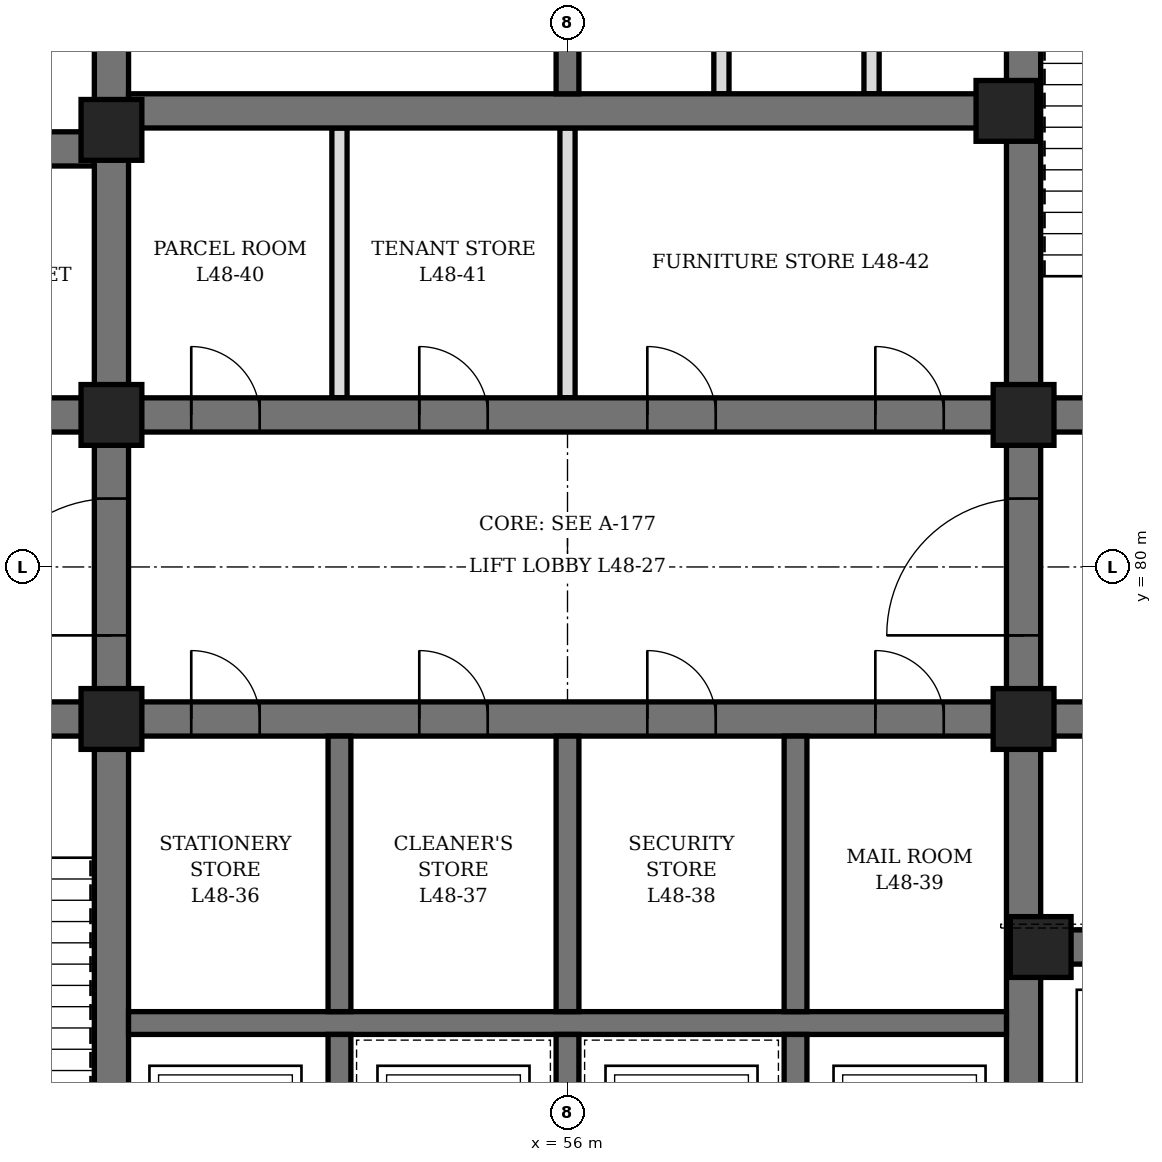
"""IFC4 building model, lengths in metres.
Left out: names, types, materials, properties, quantities, classifications, styles, units other than length and angle.
Written with IfcOpenShell. Run it as: python <this file> out.ifc"""

import sys

from ifc_helpers import new_model, si_unit, direction, frame, frame_2d, origin, origin_2d, place, context, subcontext, project, spatial, rectangle, hollow_rectangle, extrude, element, fill, save


model = new_model("IFC4")
c1 = context("Model", 3, precision=1e-05, world=origin(), true_north=direction((0.0, 1.0)))
c2 = subcontext(c1, "Body", "Model", "MODEL_VIEW")
j1 = project(units=[si_unit("LENGTHUNIT", "METRE"), si_unit("PLANEANGLEUNIT", "RADIAN")], contexts=[c1])
p1 = place(None, origin())
s1 = spatial("IfcSite", under=j1, at=p1, CompositionType="ELEMENT")
p2 = place(p1, origin())
s2 = spatial("IfcBuilding", under=s1, at=p2, CompositionType="ELEMENT")
p3 = place(p2, frame((0.0, 0.0, 214.9)))
s3 = spatial("IfcBuildingStorey", under=s2, at=p3, CompositionType="ELEMENT", Elevation=214.9)
p4 = place(p3, frame((50.0, 71.6, 0.0), z_axis=(0.0, 0.0, 1.0), x_axis=(0.0, 1.0, 0.0)))
e1 = element("IfcWall", 1, at=p4, inside=s3, PredefinedType="SHEAR", context=c2, shape_type="SweptSolid", body=[
    extrude(rectangle(XDim=16.8, YDim=0.45, at=frame_2d((8.4, 0.0))), origin(), (0.0, 0.0, 1.0), 4.2),
])
p5 = place(p4, frame((7.5, 0.0, 0.0)))
e2 = element("IfcOpeningElement", 2, at=p5, cuts=e1, PredefinedType="OPENING", context=c2, shape_type="SweptSolid", body=[
    extrude(rectangle(XDim=1.8, YDim=2.4, at=frame_2d((0.9, 1.2))), frame((0.0, 0.235, 0.0), z_axis=(0.0, -1.0, 0.0), x_axis=(1.0, 0.0, 0.0)), (0.0, 0.0, 1.0), 0.47),
])
p6 = place(p3, frame((62.0, 71.6, 0.0), z_axis=(0.0, 0.0, 1.0), x_axis=(0.0, 1.0, 0.0)))
e3 = element("IfcWall", 3, at=p6, inside=s3, PredefinedType="SHEAR", context=c2, shape_type="SweptSolid", body=[
    extrude(rectangle(XDim=16.8, YDim=0.45, at=frame_2d((8.4, 0.0))), origin(), (0.0, 0.0, 1.0), 4.2),
])
p7 = place(p6, frame((7.5, 0.0, 0.0)))
e4 = element("IfcOpeningElement", 4, at=p7, cuts=e3, PredefinedType="OPENING", context=c2, shape_type="SweptSolid", body=[
    extrude(rectangle(XDim=1.8, YDim=2.4, at=frame_2d((0.9, 1.2))), frame((0.0, 0.235, 0.0), z_axis=(0.0, -1.0, 0.0), x_axis=(1.0, 0.0, 0.0)), (0.0, 0.0, 1.0), 0.47),
])
p8 = place(p3, frame((44.6, 78.0, 0.0), z_axis=(0.0, 0.0, 1.0), x_axis=(1.0, 0.0, 0.0)))
e5 = element("IfcWall", 5, at=p8, inside=s3, PredefinedType="SHEAR", context=c2, shape_type="SweptSolid", body=[
    extrude(rectangle(XDim=5.175, YDim=0.45, at=frame_2d((2.587, 0.0))), origin(), (0.0, 0.0, 1.0), 4.2),
])
p9 = place(p8, frame((1.8, 0.0, 0.0)))
e6 = element("IfcOpeningElement", 6, at=p9, cuts=e5, PredefinedType="OPENING", context=c2, shape_type="SweptSolid", body=[
    extrude(rectangle(XDim=1.2, YDim=2.1, at=frame_2d((0.6, 1.05))), frame((0.0, 0.235, 0.0), z_axis=(0.0, -1.0, 0.0), x_axis=(1.0, 0.0, 0.0)), (0.0, 0.0, 1.0), 0.47),
])
p10 = place(p3, frame((44.6, 82.0, 0.0), z_axis=(0.0, 0.0, 1.0), x_axis=(1.0, 0.0, 0.0)))
e7 = element("IfcWall", 7, at=p10, inside=s3, PredefinedType="SHEAR", context=c2, shape_type="SweptSolid", body=[
    extrude(rectangle(XDim=5.175, YDim=0.45, at=frame_2d((2.587, 0.0))), origin(), (0.0, 0.0, 1.0), 4.2),
])
p11 = place(p10, frame((0.7, 0.0, 0.0)))
e8 = element("IfcOpeningElement", 8, at=p11, cuts=e7, PredefinedType="OPENING", context=c2, shape_type="SweptSolid", body=[
    extrude(rectangle(XDim=0.9, YDim=2.1, at=frame_2d((0.45, 1.05))), frame((0.0, 0.235, 0.0), z_axis=(0.0, -1.0, 0.0), x_axis=(1.0, 0.0, 0.0)), (0.0, 0.0, 1.0), 0.47),
])
p12 = place(p3, frame((44.6, 85.5, 0.0), z_axis=(0.0, 0.0, 1.0), x_axis=(1.0, 0.0, 0.0)))
e9 = element("IfcWall", 9, at=p12, inside=s3, PredefinedType="SHEAR", context=c2, shape_type="SweptSolid", body=[
    extrude(rectangle(XDim=5.175, YDim=0.45, at=frame_2d((2.587, 0.0))), origin(), (0.0, 0.0, 1.0), 4.2),
])
p13 = place(p12, frame((0.7, 0.0, 0.0)))
e10 = element("IfcOpeningElement", 10, at=p13, cuts=e9, PredefinedType="OPENING", context=c2, shape_type="SweptSolid", body=[
    extrude(rectangle(XDim=0.9, YDim=2.1, at=frame_2d((0.45, 1.05))), frame((0.0, 0.235, 0.0), z_axis=(0.0, -1.0, 0.0), x_axis=(1.0, 0.0, 0.0)), (0.0, 0.0, 1.0), 0.47),
])
p14 = place(p3, frame((62.225, 75.0, 0.0), z_axis=(0.0, 0.0, 1.0), x_axis=(1.0, 0.0, 0.0)))
e11 = element("IfcWall", 11, at=p14, inside=s3, PredefinedType="SHEAR", context=c2, shape_type="SweptSolid", body=[
    extrude(rectangle(XDim=5.175, YDim=0.45, at=frame_2d((2.587, 0.0))), origin(), (0.0, 0.0, 1.0), 4.2),
])
p15 = place(p14, frame((0.675, 0.0, 0.0)))
e12 = element("IfcOpeningElement", 12, at=p15, cuts=e11, PredefinedType="OPENING", context=c2, shape_type="SweptSolid", body=[
    extrude(rectangle(XDim=1.2, YDim=2.2, at=frame_2d((0.6, 1.1))), frame((0.0, 0.235, 0.0), z_axis=(0.0, -1.0, 0.0), x_axis=(1.0, 0.0, 0.0)), (0.0, 0.0, 1.0), 0.47),
])
p16 = place(p14, frame((3.425, 0.0, 0.0)))
e13 = element("IfcOpeningElement", 13, at=p16, cuts=e11, PredefinedType="OPENING", context=c2, shape_type="SweptSolid", body=[
    extrude(rectangle(XDim=1.2, YDim=2.2, at=frame_2d((0.6, 1.1))), frame((0.0, 0.235, 0.0), z_axis=(0.0, -1.0, 0.0), x_axis=(1.0, 0.0, 0.0)), (0.0, 0.0, 1.0), 0.47),
])
p17 = place(p3, frame((62.225, 78.0, 0.0), z_axis=(0.0, 0.0, 1.0), x_axis=(1.0, 0.0, 0.0)))
e14 = element("IfcWall", 14, at=p17, inside=s3, PredefinedType="SHEAR", context=c2, shape_type="SweptSolid", body=[
    extrude(rectangle(XDim=5.175, YDim=0.45, at=frame_2d((2.587, 0.0))), origin(), (0.0, 0.0, 1.0), 4.2),
])
p18 = place(p17, frame((2.175, 0.0, 0.0)))
e15 = element("IfcOpeningElement", 15, at=p18, cuts=e14, PredefinedType="OPENING", context=c2, shape_type="SweptSolid", body=[
    extrude(rectangle(XDim=1.2, YDim=2.1, at=frame_2d((0.6, 1.05))), frame((0.0, 0.235, 0.0), z_axis=(0.0, -1.0, 0.0), x_axis=(1.0, 0.0, 0.0)), (0.0, 0.0, 1.0), 0.47),
])
p19 = place(p3, frame((62.225, 82.0, 0.0), z_axis=(0.0, 0.0, 1.0), x_axis=(1.0, 0.0, 0.0)))
e16 = element("IfcWall", 16, at=p19, inside=s3, PredefinedType="SHEAR", context=c2, shape_type="SweptSolid", body=[
    extrude(rectangle(XDim=5.175, YDim=0.45, at=frame_2d((2.587, 0.0))), origin(), (0.0, 0.0, 1.0), 4.2),
])
p20 = place(p19, frame((2.175, 0.0, 0.0)))
e17 = element("IfcOpeningElement", 17, at=p20, cuts=e16, PredefinedType="OPENING", context=c2, shape_type="SweptSolid", body=[
    extrude(rectangle(XDim=1.2, YDim=2.1, at=frame_2d((0.6, 1.05))), frame((0.0, 0.235, 0.0), z_axis=(0.0, -1.0, 0.0), x_axis=(1.0, 0.0, 0.0)), (0.0, 0.0, 1.0), 0.47),
])
p21 = place(p3, frame((50.225, 78.0, 0.0), z_axis=(0.0, 0.0, 1.0), x_axis=(1.0, 0.0, 0.0)))
e18 = element("IfcWall", 18, at=p21, inside=s3, PredefinedType="SHEAR", context=c2, shape_type="SweptSolid", body=[
    extrude(rectangle(XDim=11.55, YDim=0.45, at=frame_2d((5.775, 0.0))), origin(), (0.0, 0.0, 1.0), 4.2),
])
p22 = place(p21, frame((0.825, 0.0, 0.0)))
e19 = element("IfcOpeningElement", 19, at=p22, cuts=e18, PredefinedType="OPENING", context=c2, shape_type="SweptSolid", body=[
    extrude(rectangle(XDim=0.9, YDim=2.1, at=frame_2d((0.45, 1.05))), frame((0.0, 0.235, 0.0), z_axis=(0.0, -1.0, 0.0), x_axis=(1.0, 0.0, 0.0)), (0.0, 0.0, 1.0), 0.47),
])
p23 = place(p21, frame((3.825, 0.0, 0.0)))
e20 = element("IfcOpeningElement", 20, at=p23, cuts=e18, PredefinedType="OPENING", context=c2, shape_type="SweptSolid", body=[
    extrude(rectangle(XDim=0.9, YDim=2.1, at=frame_2d((0.45, 1.05))), frame((0.0, 0.235, 0.0), z_axis=(0.0, -1.0, 0.0), x_axis=(1.0, 0.0, 0.0)), (0.0, 0.0, 1.0), 0.47),
])
p24 = place(p21, frame((6.825, 0.0, 0.0)))
e21 = element("IfcOpeningElement", 21, at=p24, cuts=e18, PredefinedType="OPENING", context=c2, shape_type="SweptSolid", body=[
    extrude(rectangle(XDim=0.9, YDim=2.1, at=frame_2d((0.45, 1.05))), frame((0.0, 0.235, 0.0), z_axis=(0.0, -1.0, 0.0), x_axis=(1.0, 0.0, 0.0)), (0.0, 0.0, 1.0), 0.47),
])
p25 = place(p21, frame((9.825, 0.0, 0.0)))
e22 = element("IfcOpeningElement", 22, at=p25, cuts=e18, PredefinedType="OPENING", context=c2, shape_type="SweptSolid", body=[
    extrude(rectangle(XDim=0.9, YDim=2.1, at=frame_2d((0.45, 1.05))), frame((0.0, 0.235, 0.0), z_axis=(0.0, -1.0, 0.0), x_axis=(1.0, 0.0, 0.0)), (0.0, 0.0, 1.0), 0.47),
])
p26 = place(p3, frame((50.225, 82.0, 0.0), z_axis=(0.0, 0.0, 1.0), x_axis=(1.0, 0.0, 0.0)))
e23 = element("IfcWall", 23, at=p26, inside=s3, PredefinedType="SHEAR", context=c2, shape_type="SweptSolid", body=[
    extrude(rectangle(XDim=11.55, YDim=0.45, at=frame_2d((5.775, 0.0))), origin(), (0.0, 0.0, 1.0), 4.2),
])
p27 = place(p26, frame((0.825, 0.0, 0.0)))
e24 = element("IfcOpeningElement", 24, at=p27, cuts=e23, PredefinedType="OPENING", context=c2, shape_type="SweptSolid", body=[
    extrude(rectangle(XDim=0.9, YDim=2.1, at=frame_2d((0.45, 1.05))), frame((0.0, 0.235, 0.0), z_axis=(0.0, -1.0, 0.0), x_axis=(1.0, 0.0, 0.0)), (0.0, 0.0, 1.0), 0.47),
])
p28 = place(p26, frame((3.825, 0.0, 0.0)))
e25 = element("IfcOpeningElement", 25, at=p28, cuts=e23, PredefinedType="OPENING", context=c2, shape_type="SweptSolid", body=[
    extrude(rectangle(XDim=0.9, YDim=2.1, at=frame_2d((0.45, 1.05))), frame((0.0, 0.235, 0.0), z_axis=(0.0, -1.0, 0.0), x_axis=(1.0, 0.0, 0.0)), (0.0, 0.0, 1.0), 0.47),
])
p29 = place(p26, frame((6.825, 0.0, 0.0)))
e26 = element("IfcOpeningElement", 26, at=p29, cuts=e23, PredefinedType="OPENING", context=c2, shape_type="SweptSolid", body=[
    extrude(rectangle(XDim=0.9, YDim=2.1, at=frame_2d((0.45, 1.05))), frame((0.0, 0.235, 0.0), z_axis=(0.0, -1.0, 0.0), x_axis=(1.0, 0.0, 0.0)), (0.0, 0.0, 1.0), 0.47),
])
p30 = place(p26, frame((9.825, 0.0, 0.0)))
e27 = element("IfcOpeningElement", 27, at=p30, cuts=e23, PredefinedType="OPENING", context=c2, shape_type="SweptSolid", body=[
    extrude(rectangle(XDim=0.9, YDim=2.1, at=frame_2d((0.45, 1.05))), frame((0.0, 0.235, 0.0), z_axis=(0.0, -1.0, 0.0), x_axis=(1.0, 0.0, 0.0)), (0.0, 0.0, 1.0), 0.47),
])
p31 = place(p3, frame((50.225, 86.0, 0.0), z_axis=(0.0, 0.0, 1.0), x_axis=(1.0, 0.0, 0.0)))
e28 = element("IfcWall", 28, at=p31, inside=s3, PredefinedType="SHEAR", context=c2, shape_type="SweptSolid", body=[
    extrude(rectangle(XDim=11.55, YDim=0.45, at=frame_2d((5.775, 0.0))), origin(), (0.0, 0.0, 1.0), 4.2),
])
p32 = place(p3, frame((50.225, 74.0, 0.0), z_axis=(0.0, 0.0, 1.0), x_axis=(1.0, 0.0, 0.0)))
e29 = element("IfcWall", 29, at=p32, inside=s3, PredefinedType="SHEAR", context=c2, shape_type="SweptSolid", body=[
    extrude(rectangle(XDim=11.55, YDim=0.3, at=frame_2d((5.775, 0.0))), origin(), (0.0, 0.0, 1.0), 4.2),
])
p33 = place(p3, frame((53.0, 71.6, 0.0), z_axis=(0.0, 0.0, 1.0), x_axis=(0.0, 1.0, 0.0)))
e30 = element("IfcWall", 30, at=p33, inside=s3, PredefinedType="SHEAR", context=c2, shape_type="SweptSolid", body=[
    extrude(rectangle(XDim=2.25, YDim=0.3, at=frame_2d((1.125, 0.0))), origin(), (0.0, 0.0, 1.0), 4.2),
])
p34 = place(p3, frame((53.0, 74.15, 0.0), z_axis=(0.0, 0.0, 1.0), x_axis=(0.0, 1.0, 0.0)))
e31 = element("IfcWall", 31, at=p34, inside=s3, PredefinedType="SHEAR", context=c2, shape_type="SweptSolid", body=[
    extrude(rectangle(XDim=3.625, YDim=0.3, at=frame_2d((1.812, 0.0))), origin(), (0.0, 0.0, 1.0), 4.2),
])
p35 = place(p3, frame((56.0, 71.6, 0.0), z_axis=(0.0, 0.0, 1.0), x_axis=(0.0, 1.0, 0.0)))
e32 = element("IfcWall", 32, at=p35, inside=s3, PredefinedType="SHEAR", context=c2, shape_type="SweptSolid", body=[
    extrude(rectangle(XDim=2.25, YDim=0.3, at=frame_2d((1.125, 0.0))), origin(), (0.0, 0.0, 1.0), 4.2),
])
p36 = place(p3, frame((56.0, 74.15, 0.0), z_axis=(0.0, 0.0, 1.0), x_axis=(0.0, 1.0, 0.0)))
e33 = element("IfcWall", 33, at=p36, inside=s3, PredefinedType="SHEAR", context=c2, shape_type="SweptSolid", body=[
    extrude(rectangle(XDim=3.625, YDim=0.3, at=frame_2d((1.812, 0.0))), origin(), (0.0, 0.0, 1.0), 4.2),
])
p37 = place(p3, frame((59.0, 71.6, 0.0), z_axis=(0.0, 0.0, 1.0), x_axis=(0.0, 1.0, 0.0)))
e34 = element("IfcWall", 34, at=p37, inside=s3, PredefinedType="SHEAR", context=c2, shape_type="SweptSolid", body=[
    extrude(rectangle(XDim=2.25, YDim=0.3, at=frame_2d((1.125, 0.0))), origin(), (0.0, 0.0, 1.0), 4.2),
])
p38 = place(p3, frame((59.0, 74.15, 0.0), z_axis=(0.0, 0.0, 1.0), x_axis=(0.0, 1.0, 0.0)))
e35 = element("IfcWall", 35, at=p38, inside=s3, PredefinedType="SHEAR", context=c2, shape_type="SweptSolid", body=[
    extrude(rectangle(XDim=3.625, YDim=0.3, at=frame_2d((1.812, 0.0))), origin(), (0.0, 0.0, 1.0), 4.2),
])
p39 = place(p3, frame((56.0, 86.225, 0.0), z_axis=(0.0, 0.0, 1.0), x_axis=(0.0, 1.0, 0.0)))
e36 = element("IfcWall", 36, at=p39, inside=s3, PredefinedType="SHEAR", context=c2, shape_type="SweptSolid", body=[
    extrude(rectangle(XDim=2.175, YDim=0.3, at=frame_2d((1.087, 0.0))), origin(), (0.0, 0.0, 1.0), 4.2),
])
for number, where, z_axis, x_axis in (
    (37, (50.0, 78.0, 0.0), (0.0, 0.0, 1.0), (1.0, 0.0, 0.0)),
    (38, (50.0, 82.0, 0.0), (0.0, 0.0, 1.0), (1.0, 0.0, 0.0)),
    (39, (50.0, 85.75, 0.0), (0.0, 0.0, 1.0), (1.0, 0.0, 0.0)),
    (40, (61.775, 86.0, 0.0), (0.0, 0.0, 1.0), (1.0, 0.0, 0.0)),
    (41, (62.0, 78.0, 0.0), (0.0, 0.0, 1.0), (1.0, 0.0, 0.0)),
    (42, (62.0, 82.0, 0.0), (0.0, 0.0, 1.0), (1.0, 0.0, 0.0)),
    (43, (62.225, 75.0, 0.0), (0.0, 0.0, 1.0), (1.0, 0.0, 0.0)),
):
    element("IfcColumn", number, at=place(p3, frame(where, z_axis=z_axis, x_axis=x_axis)), inside=s3, PredefinedType="COLUMN", context=c2, shape_type="SweptSolid", body=[
        extrude(hollow_rectangle(XDim=0.8, YDim=0.8, WallThickness=0.1, at=origin_2d()), origin(), (0.0, 0.0, 1.0), 4.2),
    ])
p40 = place(p3, frame((60.0, 86.225, 0.0), z_axis=(0.0, 0.0, 1.0), x_axis=(0.0, 1.0, 0.0)))
e44 = element("IfcWall", 44, at=p40, inside=s3, PredefinedType="PARTITIONING", context=c2, shape_type="SweptSolid", body=[
    extrude(rectangle(XDim=2.175, YDim=0.2, at=frame_2d((1.087, 0.0))), origin(), (0.0, 0.0, 1.0), 4.04),
])
p41 = place(p40, frame((0.637, 0.0, 0.0)))
e45 = element("IfcOpeningElement", 45, at=p41, cuts=e44, PredefinedType="OPENING", context=c2, shape_type="SweptSolid", body=[
    extrude(rectangle(XDim=0.9, YDim=2.1, at=frame_2d((0.45, 1.05))), frame((0.0, 0.11, 0.0), z_axis=(0.0, -1.0, 0.0), x_axis=(1.0, 0.0, 0.0)), (0.0, 0.0, 1.0), 0.22),
])
p42 = place(p3, frame((58.025, 86.225, 0.0), z_axis=(0.0, 0.0, 1.0), x_axis=(0.0, 1.0, 0.0)))
e46 = element("IfcWall", 46, at=p42, inside=s3, PredefinedType="PARTITIONING", context=c2, shape_type="SweptSolid", body=[
    extrude(rectangle(XDim=2.175, YDim=0.2, at=frame_2d((1.087, 0.0))), origin(), (0.0, 0.0, 1.0), 4.04),
])
p43 = place(p3, frame((53.0, 82.225, 0.0), z_axis=(0.0, 0.0, 1.0), x_axis=(0.0, 1.0, 0.0)))
e47 = element("IfcWall", 47, at=p43, inside=s3, PredefinedType="PARTITIONING", context=c2, shape_type="SweptSolid", body=[
    extrude(rectangle(XDim=3.55, YDim=0.2, at=frame_2d((1.775, 0.0))), origin(), (0.0, 0.0, 1.0), 4.04),
])
p44 = place(p3, frame((56.0, 82.225, 0.0), z_axis=(0.0, 0.0, 1.0), x_axis=(0.0, 1.0, 0.0)))
e48 = element("IfcWall", 48, at=p44, inside=s3, PredefinedType="PARTITIONING", context=c2, shape_type="SweptSolid", body=[
    extrude(rectangle(XDim=3.55, YDim=0.2, at=frame_2d((1.775, 0.0))), origin(), (0.0, 0.0, 1.0), 3.14),
])
p45 = place(p22, origin())
e49 = element("IfcDoor", 49, at=p45, inside=s3, OperationType="SINGLE_SWING_LEFT", PredefinedType="DOOR", context=c2, shape_type="SweptSolid", body=[
    extrude(rectangle(XDim=0.9, YDim=2.1, at=frame_2d((0.45, 1.05))), frame((0.0, 0.225, 0.0), z_axis=(0.0, -1.0, 0.0), x_axis=(1.0, 0.0, 0.0)), (0.0, 0.0, 1.0), 0.449),
])
fill(e19, e49)
p46 = place(p23, origin())
e50 = element("IfcDoor", 50, at=p46, inside=s3, OperationType="SINGLE_SWING_LEFT", PredefinedType="DOOR", context=c2, shape_type="SweptSolid", body=[
    extrude(rectangle(XDim=0.9, YDim=2.1, at=frame_2d((0.45, 1.05))), frame((0.0, 0.225, 0.0), z_axis=(0.0, -1.0, 0.0), x_axis=(1.0, 0.0, 0.0)), (0.0, 0.0, 1.0), 0.449),
])
fill(e20, e50)
p47 = place(p24, origin())
e51 = element("IfcDoor", 51, at=p47, inside=s3, OperationType="SINGLE_SWING_LEFT", PredefinedType="DOOR", context=c2, shape_type="SweptSolid", body=[
    extrude(rectangle(XDim=0.9, YDim=2.1, at=frame_2d((0.45, 1.05))), frame((0.0, 0.225, 0.0), z_axis=(0.0, -1.0, 0.0), x_axis=(1.0, 0.0, 0.0)), (0.0, 0.0, 1.0), 0.449),
])
fill(e21, e51)
p48 = place(p25, origin())
e52 = element("IfcDoor", 52, at=p48, inside=s3, OperationType="SINGLE_SWING_LEFT", PredefinedType="DOOR", context=c2, shape_type="SweptSolid", body=[
    extrude(rectangle(XDim=0.9, YDim=2.1, at=frame_2d((0.45, 1.05))), frame((0.0, 0.225, 0.0), z_axis=(0.0, -1.0, 0.0), x_axis=(1.0, 0.0, 0.0)), (0.0, 0.0, 1.0), 0.449),
])
fill(e22, e52)
p49 = place(p27, origin())
e53 = element("IfcDoor", 53, at=p49, inside=s3, OperationType="SINGLE_SWING_LEFT", PredefinedType="DOOR", context=c2, shape_type="SweptSolid", body=[
    extrude(rectangle(XDim=0.9, YDim=2.1, at=frame_2d((0.45, 1.05))), frame((0.0, 0.225, 0.0), z_axis=(0.0, -1.0, 0.0), x_axis=(1.0, 0.0, 0.0)), (0.0, 0.0, 1.0), 0.449),
])
fill(e24, e53)
p50 = place(p28, origin())
e54 = element("IfcDoor", 54, at=p50, inside=s3, OperationType="SINGLE_SWING_LEFT", PredefinedType="DOOR", context=c2, shape_type="SweptSolid", body=[
    extrude(rectangle(XDim=0.9, YDim=2.1, at=frame_2d((0.45, 1.05))), frame((0.0, 0.225, 0.0), z_axis=(0.0, -1.0, 0.0), x_axis=(1.0, 0.0, 0.0)), (0.0, 0.0, 1.0), 0.449),
])
fill(e25, e54)
p51 = place(p29, origin())
e55 = element("IfcDoor", 55, at=p51, inside=s3, OperationType="SINGLE_SWING_LEFT", PredefinedType="DOOR", context=c2, shape_type="SweptSolid", body=[
    extrude(rectangle(XDim=0.9, YDim=2.1, at=frame_2d((0.45, 1.05))), frame((0.0, 0.225, 0.0), z_axis=(0.0, -1.0, 0.0), x_axis=(1.0, 0.0, 0.0)), (0.0, 0.0, 1.0), 0.449),
])
fill(e26, e55)
p52 = place(p30, origin())
e56 = element("IfcDoor", 56, at=p52, inside=s3, OperationType="SINGLE_SWING_LEFT", PredefinedType="DOOR", context=c2, shape_type="SweptSolid", body=[
    extrude(rectangle(XDim=0.9, YDim=2.1, at=frame_2d((0.45, 1.05))), frame((0.0, 0.225, 0.0), z_axis=(0.0, -1.0, 0.0), x_axis=(1.0, 0.0, 0.0)), (0.0, 0.0, 1.0), 0.449),
])
fill(e27, e56)
p53 = place(p5, origin())
e57 = element("IfcDoor", 57, at=p53, inside=s3, OperationType="DOUBLE_DOOR_SINGLE_SWING", PredefinedType="DOOR", context=c2, shape_type="SweptSolid", body=[
    extrude(rectangle(XDim=1.8, YDim=2.4, at=frame_2d((0.9, 1.2))), frame((0.0, 0.225, 0.0), z_axis=(0.0, -1.0, 0.0), x_axis=(1.0, 0.0, 0.0)), (0.0, 0.0, 1.0), 0.449),
])
fill(e2, e57)
p54 = place(p7, origin())
e58 = element("IfcDoor", 58, at=p54, inside=s3, OperationType="DOUBLE_DOOR_SINGLE_SWING", PredefinedType="DOOR", context=c2, shape_type="SweptSolid", body=[
    extrude(rectangle(XDim=1.8, YDim=2.4, at=frame_2d((0.9, 1.2))), frame((0.0, 0.225, 0.0), z_axis=(0.0, -1.0, 0.0), x_axis=(1.0, 0.0, 0.0)), (0.0, 0.0, 1.0), 0.449),
])
fill(e4, e58)
save(model, sys.argv[1])
